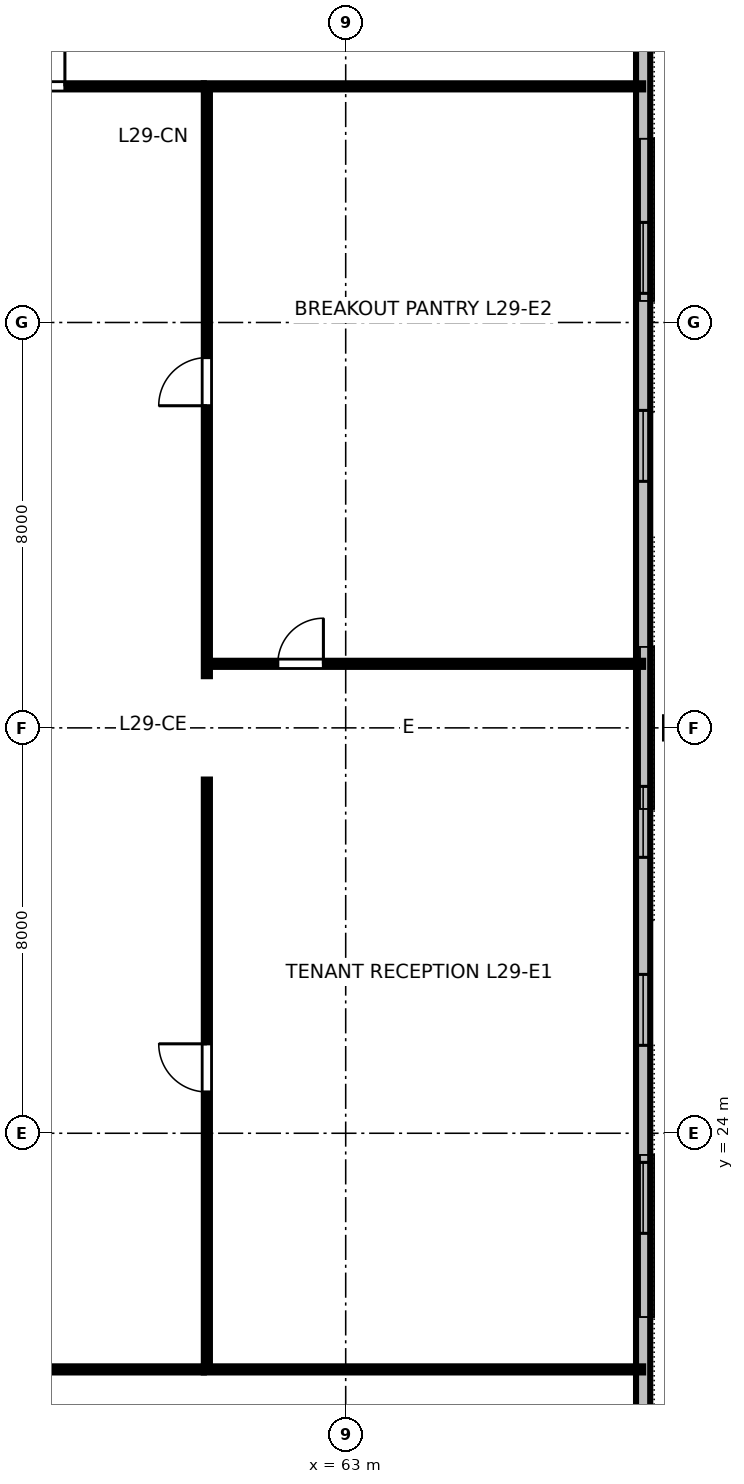
"""IFC4 building model, lengths in metres.
Left out: names, types, materials, properties, quantities, classifications, styles, units other than length and angle.
Written with IfcOpenShell. Run it as: python <this file> out.ifc"""

import sys

from ifc_helpers import new_model, si_unit, direction, frame, frame_2d, origin, origin_2d, place, context, subcontext, project, spatial, rectangle, i_section, extrude, element, fill, save


model = new_model("IFC4")
c1 = context("Model", 3, precision=1e-05, world=origin(), true_north=direction((0.0, 1.0)))
c2 = subcontext(c1, "Body", "Model", "MODEL_VIEW")
j1 = project(units=[si_unit("LENGTHUNIT", "METRE"), si_unit("PLANEANGLEUNIT", "RADIAN")], contexts=[c1])
p1 = place(None, origin())
s1 = spatial("IfcSite", under=j1, at=p1, CompositionType="ELEMENT")
p2 = place(p1, origin())
s2 = spatial("IfcBuilding", under=s1, at=p2, CompositionType="ELEMENT")
p3 = place(p2, frame((0.0, 0.0, 113.2)))
s3 = spatial("IfcBuildingStorey", under=s2, at=p3, CompositionType="ELEMENT", Elevation=113.2)
p4 = place(p3, frame((69.53, 32.0, 0.0), z_axis=(-0.19007295017, 0.0, 0.981769969806), x_axis=(0.981769969806, 0.0, 0.19007295017)))
e1 = element("IfcColumn", 1, at=p4, inside=s3, PredefinedType="COLUMN", context=c2, shape_type="SweptSolid", body=[
    extrude(i_section(OverallWidth=0.418, OverallDepth=0.455, WebThickness=0.042, FlangeThickness=0.068, FilletRadius=0.025, at=origin_2d()), origin(), (0.0, 0.0, 1.0), 3.42),
])
p5 = place(p3, frame((68.87, 16.06, 0.0), z_axis=(0.0, 0.0, 1.0), x_axis=(0.0, 1.0, 0.0)))
e2 = element("IfcWall", 2, at=p5, inside=s3, PredefinedType="STANDARD", context=c2, shape_type="SweptSolid", body=[
    extrude(rectangle(XDim=31.88, YDim=0.28, at=frame_2d((15.94, 0.0))), origin(), (0.0, 0.0, 1.0), 2.662),
])
p6 = place(p5, frame((5.965, 0.0, 0.85)))
e3 = element("IfcOpeningElement", 3, at=p6, cuts=e2, PredefinedType="OPENING", context=c2, shape_type="SweptSolid", body=[
    extrude(rectangle(XDim=1.4, YDim=1.2, at=frame_2d((0.7, 0.6))), frame((0.0, 0.15, 0.0), z_axis=(0.0, -1.0, 0.0), x_axis=(1.0, 0.0, 0.0)), (0.0, 0.0, 1.0), 0.3),
])
p7 = place(p5, frame((9.675, 0.0, 0.85)))
e4 = element("IfcOpeningElement", 4, at=p7, cuts=e2, PredefinedType="OPENING", context=c2, shape_type="SweptSolid", body=[
    extrude(rectangle(XDim=1.4, YDim=1.2, at=frame_2d((0.7, 0.6))), frame((0.0, 0.15, 0.0), z_axis=(0.0, -1.0, 0.0), x_axis=(1.0, 0.0, 0.0)), (0.0, 0.0, 1.0), 0.3),
])
p8 = place(p5, frame((13.385, 0.0, 0.85)))
e5 = element("IfcOpeningElement", 5, at=p8, cuts=e2, PredefinedType="OPENING", context=c2, shape_type="SweptSolid", body=[
    extrude(rectangle(XDim=1.4, YDim=1.2, at=frame_2d((0.7, 0.6))), frame((0.0, 0.15, 0.0), z_axis=(0.0, -1.0, 0.0), x_axis=(1.0, 0.0, 0.0)), (0.0, 0.0, 1.0), 0.3),
])
p9 = place(p5, frame((20.805, 0.0, 0.85)))
e6 = element("IfcOpeningElement", 6, at=p9, cuts=e2, PredefinedType="OPENING", context=c2, shape_type="SweptSolid", body=[
    extrude(rectangle(XDim=1.4, YDim=1.2, at=frame_2d((0.7, 0.6))), frame((0.0, 0.15, 0.0), z_axis=(0.0, -1.0, 0.0), x_axis=(1.0, 0.0, 0.0)), (0.0, 0.0, 1.0), 0.3),
])
p10 = place(p5, frame((24.515, 0.0, 0.85)))
e7 = element("IfcOpeningElement", 7, at=p10, cuts=e2, PredefinedType="OPENING", context=c2, shape_type="SweptSolid", body=[
    extrude(rectangle(XDim=1.4, YDim=1.2, at=frame_2d((0.7, 0.6))), frame((0.0, 0.15, 0.0), z_axis=(0.0, -1.0, 0.0), x_axis=(1.0, 0.0, 0.0)), (0.0, 0.0, 1.0), 0.3),
])
p11 = place(p3, frame((31.8, 19.34, 0.0), z_axis=(0.0, 0.0, 1.0), x_axis=(1.0, 0.0, 0.0)))
e8 = element("IfcWall", 8, at=p11, inside=s3, PredefinedType="PARTITIONING", context=c2, shape_type="SweptSolid", body=[
    extrude(rectangle(XDim=28.4, YDim=0.12, at=frame_2d((14.2, 0.0))), origin(), (0.0, 0.0, 1.0), 2.64),
])
p12 = place(p11, frame((3.152, 0.0, 0.0)))
e9 = element("IfcOpeningElement", 9, at=p12, cuts=e8, PredefinedType="OPENING", context=c2, shape_type="SweptSolid", body=[
    extrude(rectangle(XDim=0.95, YDim=2.15, at=frame_2d((0.475, 1.075))), frame((0.0, 0.07, 0.0), z_axis=(0.0, -1.0, 0.0), x_axis=(1.0, 0.0, 0.0)), (0.0, 0.0, 1.0), 0.14),
])
p13 = place(p11, frame((10.136, 0.0, 0.0)))
e10 = element("IfcOpeningElement", 10, at=p13, cuts=e8, PredefinedType="OPENING", context=c2, shape_type="SweptSolid", body=[
    extrude(rectangle(XDim=0.95, YDim=2.15, at=frame_2d((0.475, 1.075))), frame((0.0, 0.07, 0.0), z_axis=(0.0, -1.0, 0.0), x_axis=(1.0, 0.0, 0.0)), (0.0, 0.0, 1.0), 0.14),
])
p14 = place(p11, frame((15.813, 0.0, 0.0)))
e11 = element("IfcOpeningElement", 11, at=p14, cuts=e8, PredefinedType="OPENING", context=c2, shape_type="SweptSolid", body=[
    extrude(rectangle(XDim=0.95, YDim=2.15, at=frame_2d((0.475, 1.075))), frame((0.0, 0.07, 0.0), z_axis=(0.0, -1.0, 0.0), x_axis=(1.0, 0.0, 0.0)), (0.0, 0.0, 1.0), 0.14),
])
p15 = place(p11, frame((22.888, 0.0, 0.0)))
e12 = element("IfcOpeningElement", 12, at=p15, cuts=e8, PredefinedType="OPENING", context=c2, shape_type="SweptSolid", body=[
    extrude(rectangle(XDim=0.95, YDim=2.15, at=frame_2d((0.475, 1.075))), frame((0.0, 0.07, 0.0), z_axis=(0.0, -1.0, 0.0), x_axis=(1.0, 0.0, 0.0)), (0.0, 0.0, 1.0), 0.14),
])
p16 = place(p3, frame((31.8, 44.66, 0.0), z_axis=(0.0, 0.0, 1.0), x_axis=(1.0, 0.0, 0.0)))
e13 = element("IfcWall", 13, at=p16, inside=s3, PredefinedType="PARTITIONING", context=c2, shape_type="SweptSolid", body=[
    extrude(rectangle(XDim=28.4, YDim=0.12, at=frame_2d((14.2, 0.0))), origin(), (0.0, 0.0, 1.0), 2.64),
])
p17 = place(p16, frame((3.328, 0.0, 0.0)))
e14 = element("IfcOpeningElement", 14, at=p17, cuts=e13, PredefinedType="OPENING", context=c2, shape_type="SweptSolid", body=[
    extrude(rectangle(XDim=0.95, YDim=2.15, at=frame_2d((0.475, 1.075))), frame((0.0, 0.07, 0.0), z_axis=(0.0, -1.0, 0.0), x_axis=(1.0, 0.0, 0.0)), (0.0, 0.0, 1.0), 0.14),
])
p18 = place(p16, frame((8.901, 0.0, 0.0)))
e15 = element("IfcOpeningElement", 15, at=p18, cuts=e13, PredefinedType="OPENING", context=c2, shape_type="SweptSolid", body=[
    extrude(rectangle(XDim=0.95, YDim=2.15, at=frame_2d((0.475, 1.075))), frame((0.0, 0.07, 0.0), z_axis=(0.0, -1.0, 0.0), x_axis=(1.0, 0.0, 0.0)), (0.0, 0.0, 1.0), 0.14),
])
p19 = place(p16, frame((14.127, 0.0, 0.0)))
e16 = element("IfcOpeningElement", 16, at=p19, cuts=e13, PredefinedType="OPENING", context=c2, shape_type="SweptSolid", body=[
    extrude(rectangle(XDim=0.95, YDim=2.15, at=frame_2d((0.475, 1.075))), frame((0.0, 0.07, 0.0), z_axis=(0.0, -1.0, 0.0), x_axis=(1.0, 0.0, 0.0)), (0.0, 0.0, 1.0), 0.14),
])
p20 = place(p16, frame((19.537, 0.0, 0.0)))
e17 = element("IfcOpeningElement", 17, at=p20, cuts=e13, PredefinedType="OPENING", context=c2, shape_type="SweptSolid", body=[
    extrude(rectangle(XDim=0.95, YDim=2.15, at=frame_2d((0.475, 1.075))), frame((0.0, 0.07, 0.0), z_axis=(0.0, -1.0, 0.0), x_axis=(1.0, 0.0, 0.0)), (0.0, 0.0, 1.0), 0.14),
])
p21 = place(p16, frame((24.708, 0.0, 0.0)))
e18 = element("IfcOpeningElement", 18, at=p21, cuts=e13, PredefinedType="OPENING", context=c2, shape_type="SweptSolid", body=[
    extrude(rectangle(XDim=0.95, YDim=2.15, at=frame_2d((0.475, 1.075))), frame((0.0, 0.07, 0.0), z_axis=(0.0, -1.0, 0.0), x_axis=(1.0, 0.0, 0.0)), (0.0, 0.0, 1.0), 0.14),
])
p22 = place(p3, frame((60.26, 33.264, 0.0), z_axis=(0.0, 0.0, 1.0), x_axis=(1.0, 0.0, 0.0)))
e19 = element("IfcWall", 19, at=p22, inside=s3, PredefinedType="PARTITIONING", context=c2, shape_type="SweptSolid", body=[
    extrude(rectangle(XDim=8.61, YDim=0.12, at=frame_2d((4.305, 0.0))), origin(), (0.0, 0.0, 1.0), 2.64),
])
p23 = place(p22, frame((1.4, 0.0, 0.0)))
e20 = element("IfcOpeningElement", 20, at=p23, cuts=e19, PredefinedType="OPENING", context=c2, shape_type="SweptSolid", body=[
    extrude(rectangle(XDim=0.9, YDim=2.15, at=frame_2d((0.45, 1.075))), frame((0.0, 0.07, 0.0), z_axis=(0.0, -1.0, 0.0), x_axis=(1.0, 0.0, 0.0)), (0.0, 0.0, 1.0), 0.14),
])
p24 = place(p3, frame((60.26, 19.4, 0.0), z_axis=(0.0, 0.0, 1.0), x_axis=(0.0, 1.0, 0.0)))
e21 = element("IfcWall", 21, at=p24, inside=s3, PredefinedType="PARTITIONING", context=c2, shape_type="SweptSolid", body=[
    extrude(rectangle(XDim=11.58, YDim=0.12, at=frame_2d((5.79, 0.0))), origin(), (0.0, 0.0, 1.0), 2.64),
])
p25 = place(p24, frame((5.415, 0.0, 0.0)))
e22 = element("IfcOpeningElement", 22, at=p25, cuts=e21, PredefinedType="OPENING", context=c2, shape_type="SweptSolid", body=[
    extrude(rectangle(XDim=0.95, YDim=2.15, at=frame_2d((0.475, 1.075))), frame((0.0, 0.07, 0.0), z_axis=(0.0, -1.0, 0.0), x_axis=(1.0, 0.0, 0.0)), (0.0, 0.0, 1.0), 0.14),
])
p26 = place(p3, frame((60.26, 33.02, 0.0), z_axis=(0.0, 0.0, 1.0), x_axis=(0.0, 1.0, 0.0)))
e23 = element("IfcWall", 23, at=p26, inside=s3, PredefinedType="PARTITIONING", context=c2, shape_type="SweptSolid", body=[
    extrude(rectangle(XDim=11.58, YDim=0.12, at=frame_2d((5.79, 0.0))), origin(), (0.0, 0.0, 1.0), 2.64),
])
p27 = place(p26, frame((5.337, 0.0, 0.0)))
e24 = element("IfcOpeningElement", 24, at=p27, cuts=e23, PredefinedType="OPENING", context=c2, shape_type="SweptSolid", body=[
    extrude(rectangle(XDim=0.95, YDim=2.15, at=frame_2d((0.475, 1.075))), frame((0.0, 0.07, 0.0), z_axis=(0.0, -1.0, 0.0), x_axis=(1.0, 0.0, 0.0)), (0.0, 0.0, 1.0), 0.14),
])
for number, where, z_axis, x_axis in (
    (25, (60.2, 19.34, 0.0), (0.0, 0.0, 1.0), (1.0, 0.0, 0.0)),
    (26, (60.2, 44.66, 0.0), (0.0, 0.0, 1.0), (1.0, 0.0, 0.0)),
):
    element("IfcWall", number, at=place(p3, frame(where, z_axis=z_axis, x_axis=x_axis)), inside=s3, PredefinedType="PARTITIONING", context=c2, shape_type="SweptSolid", body=[
        extrude(rectangle(XDim=8.67, YDim=0.12, at=frame_2d((4.335, 0.0))), origin(), (0.0, 0.0, 1.0), 2.64),
    ])
p28 = place(p6, origin())
e27 = element("IfcWindow", 27, at=p28, inside=s3, PartitioningType="SINGLE_PANEL", PredefinedType="WINDOW", context=c2, shape_type="SweptSolid", body=[
    extrude(rectangle(XDim=1.4, YDim=1.2, at=frame_2d((0.7, 0.6))), frame((0.0, 0.03, 0.0), z_axis=(0.0, -1.0, 0.0), x_axis=(1.0, 0.0, 0.0)), (0.0, 0.0, 1.0), 0.06),
])
fill(e3, e27)
p29 = place(p7, origin())
e28 = element("IfcWindow", 28, at=p29, inside=s3, PartitioningType="SINGLE_PANEL", PredefinedType="WINDOW", context=c2, shape_type="SweptSolid", body=[
    extrude(rectangle(XDim=1.4, YDim=1.2, at=frame_2d((0.7, 0.6))), frame((0.0, 0.03, 0.0), z_axis=(0.0, -1.0, 0.0), x_axis=(1.0, 0.0, 0.0)), (0.0, 0.0, 1.0), 0.06),
])
fill(e4, e28)
p30 = place(p8, origin())
e29 = element("IfcWindow", 29, at=p30, inside=s3, PartitioningType="SINGLE_PANEL", PredefinedType="WINDOW", context=c2, shape_type="SweptSolid", body=[
    extrude(rectangle(XDim=1.4, YDim=1.2, at=frame_2d((0.7, 0.6))), frame((0.0, 0.03, 0.0), z_axis=(0.0, -1.0, 0.0), x_axis=(1.0, 0.0, 0.0)), (0.0, 0.0, 1.0), 0.06),
])
fill(e5, e29)
p31 = place(p9, origin())
e30 = element("IfcWindow", 30, at=p31, inside=s3, PartitioningType="SINGLE_PANEL", PredefinedType="WINDOW", context=c2, shape_type="SweptSolid", body=[
    extrude(rectangle(XDim=1.4, YDim=1.2, at=frame_2d((0.7, 0.6))), frame((0.0, 0.03, 0.0), z_axis=(0.0, -1.0, 0.0), x_axis=(1.0, 0.0, 0.0)), (0.0, 0.0, 1.0), 0.06),
])
fill(e6, e30)
p32 = place(p10, origin())
e31 = element("IfcWindow", 31, at=p32, inside=s3, PartitioningType="SINGLE_PANEL", PredefinedType="WINDOW", context=c2, shape_type="SweptSolid", body=[
    extrude(rectangle(XDim=1.4, YDim=1.2, at=frame_2d((0.7, 0.6))), frame((0.0, 0.03, 0.0), z_axis=(0.0, -1.0, 0.0), x_axis=(1.0, 0.0, 0.0)), (0.0, 0.0, 1.0), 0.06),
])
fill(e7, e31)
p33 = place(p21, origin())
e32 = element("IfcDoor", 32, at=p33, inside=s3, OperationType="SINGLE_SWING_RIGHT", PredefinedType="DOOR", context=c2, shape_type="SweptSolid", body=[
    extrude(rectangle(XDim=0.95, YDim=2.15, at=frame_2d((0.475, 1.075))), frame((0.0, 0.025, 0.0), z_axis=(0.0, -1.0, 0.0), x_axis=(1.0, 0.0, 0.0)), (0.0, 0.0, 1.0), 0.05),
])
fill(e18, e32)
p34 = place(p23, origin())
e33 = element("IfcDoor", 33, at=p34, inside=s3, OperationType="SINGLE_SWING_RIGHT", PredefinedType="DOOR", context=c2, shape_type="SweptSolid", body=[
    extrude(rectangle(XDim=0.9, YDim=2.15, at=frame_2d((0.45, 1.075))), frame((0.0, 0.025, 0.0), z_axis=(0.0, -1.0, 0.0), x_axis=(1.0, 0.0, 0.0)), (0.0, 0.0, 1.0), 0.05),
])
fill(e20, e33)
p35 = place(p25, origin())
e34 = element("IfcDoor", 34, at=p35, inside=s3, OperationType="SINGLE_SWING_RIGHT", PredefinedType="DOOR", context=c2, shape_type="SweptSolid", body=[
    extrude(rectangle(XDim=0.95, YDim=2.15, at=frame_2d((0.475, 1.075))), frame((0.0, 0.025, 0.0), z_axis=(0.0, -1.0, 0.0), x_axis=(1.0, 0.0, 0.0)), (0.0, 0.0, 1.0), 0.05),
])
fill(e22, e34)
p36 = place(p27, origin())
e35 = element("IfcDoor", 35, at=p36, inside=s3, OperationType="SINGLE_SWING_LEFT", PredefinedType="DOOR", context=c2, shape_type="SweptSolid", body=[
    extrude(rectangle(XDim=0.95, YDim=2.15, at=frame_2d((0.475, 1.075))), frame((0.0, 0.025, 0.0), z_axis=(0.0, -1.0, 0.0), x_axis=(1.0, 0.0, 0.0)), (0.0, 0.0, 1.0), 0.05),
])
fill(e24, e35)
save(model, sys.argv[1])
